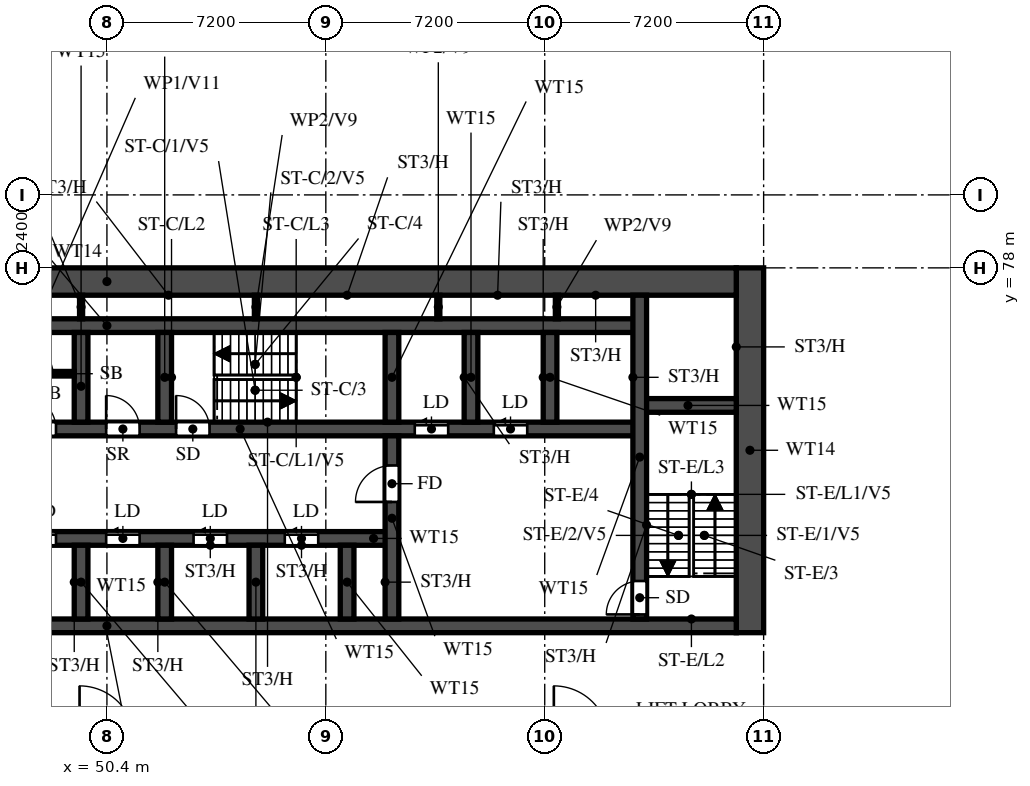
"""IFC4 building model, lengths in metres.
Left out: names, types, materials, properties, quantities, classifications, styles, units other than length and angle.
Written with IfcOpenShell. Run it as: python <this file> out.ifc"""

import sys

from ifc_helpers import new_model, si_unit, direction, frame, frame_2d, origin, place, context, subcontext, project, spatial, rectangle, extrude, element, fill, save


model = new_model("IFC4")
c1 = context("Model", 3, precision=1e-05, world=origin(), true_north=direction((0.0, 1.0)))
c2 = subcontext(c1, "Body", "Model", "MODEL_VIEW")
j1 = project(units=[si_unit("LENGTHUNIT", "METRE"), si_unit("PLANEANGLEUNIT", "RADIAN")], contexts=[c1])
p1 = place(None, origin())
s1 = spatial("IfcSite", under=j1, at=p1, CompositionType="ELEMENT")
p2 = place(p1, origin())
s2 = spatial("IfcBuilding", under=s1, at=p2, CompositionType="ELEMENT")
p3 = place(p2, origin())
s3 = spatial("IfcBuildingStorey", under=s2, at=p3, CompositionType="ELEMENT", Elevation=0.0)
p4 = place(p3, frame((71.55, 66.0, 0.0), z_axis=(0.0, 0.0, 1.0), x_axis=(0.0, 1.0, 0.0)))
e1 = element("IfcWall", 1, at=p4, inside=s3, PredefinedType="SHEAR", context=c2, shape_type="SweptSolid", body=[
    extrude(rectangle(XDim=12.0, YDim=0.9, at=frame_2d((6.0, 0.0))), origin(), (0.0, 0.0, 1.0), 7.4),
])
p5 = place(p3, frame((29.7, 77.55, 0.0), z_axis=(0.0, 0.0, 1.0), x_axis=(1.0, 0.0, 0.0)))
e2 = element("IfcWall", 2, at=p5, inside=s3, PredefinedType="SHEAR", context=c2, shape_type="SweptSolid", body=[
    extrude(rectangle(XDim=41.4, YDim=0.9, at=frame_2d((20.7, 0.0))), origin(), (0.0, 0.0, 1.0), 7.4),
])
p6 = place(p3, frame((29.7, 66.225, 0.0), z_axis=(0.0, 0.0, 1.0), x_axis=(1.0, 0.0, 0.0)))
e3 = element("IfcWall", 3, at=p6, inside=s3, PredefinedType="SHEAR", context=c2, shape_type="SweptSolid", body=[
    extrude(rectangle(XDim=41.4, YDim=0.45, at=frame_2d((20.7, 0.0))), origin(), (0.0, 0.0, 1.0), 7.4),
])
p7 = place(p6, frame((0.925, 0.0, 0.0)))
e4 = element("IfcOpeningElement", 4, at=p7, cuts=e3, PredefinedType="OPENING", context=c2, shape_type="SweptSolid", body=[
    extrude(rectangle(XDim=1.1, YDim=2.1, at=frame_2d((0.55, 1.05))), frame((0.0, 0.235, 0.0), z_axis=(0.0, -1.0, 0.0), x_axis=(1.0, 0.0, 0.0)), (0.0, 0.0, 1.0), 0.47),
])
p8 = place(p6, frame((3.738, 0.0, 0.0)))
e5 = element("IfcOpeningElement", 5, at=p8, cuts=e3, PredefinedType="OPENING", context=c2, shape_type="SweptSolid", body=[
    extrude(rectangle(XDim=1.8, YDim=2.1, at=frame_2d((0.9, 1.05))), frame((0.0, 0.235, 0.0), z_axis=(0.0, -1.0, 0.0), x_axis=(1.0, 0.0, 0.0)), (0.0, 0.0, 1.0), 0.47),
])
p9 = place(p3, frame((35.575, 69.1, 0.0), z_axis=(0.0, 0.0, 1.0), x_axis=(1.0, 0.0, 0.0)))
e6 = element("IfcWall", 6, at=p9, inside=s3, PredefinedType="SHEAR", context=c2, shape_type="SweptSolid", body=[
    extrude(rectangle(XDim=24.2, YDim=0.45, at=frame_2d((12.1, 0.0))), origin(), (0.0, 0.0, 1.0), 7.4),
])
p10 = place(p9, frame((1.05, 0.0, 0.0)))
e7 = element("IfcOpeningElement", 7, at=p10, cuts=e6, PredefinedType="OPENING", context=c2, shape_type="SweptSolid", body=[
    extrude(rectangle(XDim=1.1, YDim=2.1, at=frame_2d((0.55, 1.05))), frame((0.0, 0.235, 0.0), z_axis=(0.0, -1.0, 0.0), x_axis=(1.0, 0.0, 0.0)), (0.0, 0.0, 1.0), 0.47),
])
p11 = place(p9, frame((3.8, 0.0, 0.0)))
e8 = element("IfcOpeningElement", 8, at=p11, cuts=e6, PredefinedType="OPENING", context=c2, shape_type="SweptSolid", body=[
    extrude(rectangle(XDim=1.1, YDim=2.1, at=frame_2d((0.55, 1.05))), frame((0.0, 0.235, 0.0), z_axis=(0.0, -1.0, 0.0), x_axis=(1.0, 0.0, 0.0)), (0.0, 0.0, 1.0), 0.47),
])
p12 = place(p9, frame((6.55, 0.0, 0.0)))
e9 = element("IfcOpeningElement", 9, at=p12, cuts=e6, PredefinedType="OPENING", context=c2, shape_type="SweptSolid", body=[
    extrude(rectangle(XDim=1.1, YDim=2.1, at=frame_2d((0.55, 1.05))), frame((0.0, 0.235, 0.0), z_axis=(0.0, -1.0, 0.0), x_axis=(1.0, 0.0, 0.0)), (0.0, 0.0, 1.0), 0.47),
])
p13 = place(p9, frame((9.3, 0.0, 0.0)))
e10 = element("IfcOpeningElement", 10, at=p13, cuts=e6, PredefinedType="OPENING", context=c2, shape_type="SweptSolid", body=[
    extrude(rectangle(XDim=1.1, YDim=2.1, at=frame_2d((0.55, 1.05))), frame((0.0, 0.235, 0.0), z_axis=(0.0, -1.0, 0.0), x_axis=(1.0, 0.0, 0.0)), (0.0, 0.0, 1.0), 0.47),
])
p14 = place(p9, frame((12.05, 0.0, 0.0)))
e11 = element("IfcOpeningElement", 11, at=p14, cuts=e6, PredefinedType="OPENING", context=c2, shape_type="SweptSolid", body=[
    extrude(rectangle(XDim=1.1, YDim=2.1, at=frame_2d((0.55, 1.05))), frame((0.0, 0.235, 0.0), z_axis=(0.0, -1.0, 0.0), x_axis=(1.0, 0.0, 0.0)), (0.0, 0.0, 1.0), 0.47),
])
p15 = place(p9, frame((14.8, 0.0, 0.0)))
e12 = element("IfcOpeningElement", 12, at=p15, cuts=e6, PredefinedType="OPENING", context=c2, shape_type="SweptSolid", body=[
    extrude(rectangle(XDim=1.1, YDim=2.1, at=frame_2d((0.55, 1.05))), frame((0.0, 0.235, 0.0), z_axis=(0.0, -1.0, 0.0), x_axis=(1.0, 0.0, 0.0)), (0.0, 0.0, 1.0), 0.47),
])
p16 = place(p9, frame((17.675, 0.0, 0.0)))
e13 = element("IfcOpeningElement", 13, at=p16, cuts=e6, PredefinedType="OPENING", context=c2, shape_type="SweptSolid", body=[
    extrude(rectangle(XDim=1.1, YDim=2.1, at=frame_2d((0.55, 1.05))), frame((0.0, 0.235, 0.0), z_axis=(0.0, -1.0, 0.0), x_axis=(1.0, 0.0, 0.0)), (0.0, 0.0, 1.0), 0.47),
])
p17 = place(p9, frame((20.675, 0.0, 0.0)))
e14 = element("IfcOpeningElement", 14, at=p17, cuts=e6, PredefinedType="OPENING", context=c2, shape_type="SweptSolid", body=[
    extrude(rectangle(XDim=1.1, YDim=2.1, at=frame_2d((0.55, 1.05))), frame((0.0, 0.235, 0.0), z_axis=(0.0, -1.0, 0.0), x_axis=(1.0, 0.0, 0.0)), (0.0, 0.0, 1.0), 0.47),
])
p18 = place(p3, frame((32.875, 72.7, 0.0), z_axis=(0.0, 0.0, 1.0), x_axis=(1.0, 0.0, 0.0)))
e15 = element("IfcWall", 15, at=p18, inside=s3, PredefinedType="SHEAR", context=c2, shape_type="SweptSolid", body=[
    extrude(rectangle(XDim=35.05, YDim=0.45, at=frame_2d((17.525, 0.0))), origin(), (0.0, 0.0, 1.0), 7.4),
])
p19 = place(p18, frame((19.8, 0.0, 0.0)))
e16 = element("IfcOpeningElement", 16, at=p19, cuts=e15, PredefinedType="OPENING", context=c2, shape_type="SweptSolid", body=[
    extrude(rectangle(XDim=1.1, YDim=2.1, at=frame_2d((0.55, 1.05))), frame((0.0, 0.235, 0.0), z_axis=(0.0, -1.0, 0.0), x_axis=(1.0, 0.0, 0.0)), (0.0, 0.0, 1.0), 0.47),
])
p20 = place(p18, frame((27.65, 0.0, 0.0)))
e17 = element("IfcOpeningElement", 17, at=p20, cuts=e15, PredefinedType="OPENING", context=c2, shape_type="SweptSolid", body=[
    extrude(rectangle(XDim=1.1, YDim=2.1, at=frame_2d((0.55, 1.05))), frame((0.0, 0.235, 0.0), z_axis=(0.0, -1.0, 0.0), x_axis=(1.0, 0.0, 0.0)), (0.0, 0.0, 1.0), 0.47),
])
p21 = place(p18, frame((30.25, 0.0, 0.0)))
e18 = element("IfcOpeningElement", 18, at=p21, cuts=e15, PredefinedType="OPENING", context=c2, shape_type="SweptSolid", body=[
    extrude(rectangle(XDim=1.1, YDim=2.1, at=frame_2d((0.55, 1.05))), frame((0.0, 0.235, 0.0), z_axis=(0.0, -1.0, 0.0), x_axis=(1.0, 0.0, 0.0)), (0.0, 0.0, 1.0), 0.47),
])
p22 = place(p18, frame((3.75, 0.0, 0.0)))
e19 = element("IfcOpeningElement", 19, at=p22, cuts=e15, PredefinedType="OPENING", context=c2, shape_type="SweptSolid", body=[
    extrude(rectangle(XDim=1.1, YDim=2.1, at=frame_2d((0.55, 1.05))), frame((0.0, 0.235, 0.0), z_axis=(0.0, -1.0, 0.0), x_axis=(1.0, 0.0, 0.0)), (0.0, 0.0, 1.0), 0.47),
])
p23 = place(p18, frame((6.5, 0.0, 0.0)))
e20 = element("IfcOpeningElement", 20, at=p23, cuts=e15, PredefinedType="OPENING", context=c2, shape_type="SweptSolid", body=[
    extrude(rectangle(XDim=1.1, YDim=2.1, at=frame_2d((0.55, 1.05))), frame((0.0, 0.235, 0.0), z_axis=(0.0, -1.0, 0.0), x_axis=(1.0, 0.0, 0.0)), (0.0, 0.0, 1.0), 0.47),
])
p24 = place(p18, frame((9.25, 0.0, 0.0)))
e21 = element("IfcOpeningElement", 21, at=p24, cuts=e15, PredefinedType="OPENING", context=c2, shape_type="SweptSolid", body=[
    extrude(rectangle(XDim=1.1, YDim=2.1, at=frame_2d((0.55, 1.05))), frame((0.0, 0.235, 0.0), z_axis=(0.0, -1.0, 0.0), x_axis=(1.0, 0.0, 0.0)), (0.0, 0.0, 1.0), 0.47),
])
p25 = place(p18, frame((12.0, 0.0, 0.0)))
e22 = element("IfcOpeningElement", 22, at=p25, cuts=e15, PredefinedType="OPENING", context=c2, shape_type="SweptSolid", body=[
    extrude(rectangle(XDim=1.1, YDim=2.1, at=frame_2d((0.55, 1.05))), frame((0.0, 0.235, 0.0), z_axis=(0.0, -1.0, 0.0), x_axis=(1.0, 0.0, 0.0)), (0.0, 0.0, 1.0), 0.47),
])
p26 = place(p18, frame((14.75, 0.0, 0.0)))
e23 = element("IfcOpeningElement", 23, at=p26, cuts=e15, PredefinedType="OPENING", context=c2, shape_type="SweptSolid", body=[
    extrude(rectangle(XDim=1.1, YDim=2.1, at=frame_2d((0.55, 1.05))), frame((0.0, 0.235, 0.0), z_axis=(0.0, -1.0, 0.0), x_axis=(1.0, 0.0, 0.0)), (0.0, 0.0, 1.0), 0.47),
])
p27 = place(p18, frame((17.5, 0.0, 0.0)))
e24 = element("IfcOpeningElement", 24, at=p27, cuts=e15, PredefinedType="OPENING", context=c2, shape_type="SweptSolid", body=[
    extrude(rectangle(XDim=1.1, YDim=2.1, at=frame_2d((0.55, 1.05))), frame((0.0, 0.235, 0.0), z_axis=(0.0, -1.0, 0.0), x_axis=(1.0, 0.0, 0.0)), (0.0, 0.0, 1.0), 0.47),
])
p28 = place(p18, frame((0.913, 0.0, 0.0)))
e25 = element("IfcOpeningElement", 25, at=p28, cuts=e15, PredefinedType="OPENING", context=c2, shape_type="SweptSolid", body=[
    extrude(rectangle(XDim=1.1, YDim=2.1, at=frame_2d((0.55, 1.05))), frame((0.0, 0.235, 0.0), z_axis=(0.0, -1.0, 0.0), x_axis=(1.0, 0.0, 0.0)), (0.0, 0.0, 1.0), 0.47),
])
p29 = place(p3, frame((32.875, 76.1, 0.0), z_axis=(0.0, 0.0, 1.0), x_axis=(1.0, 0.0, 0.0)))
e26 = element("IfcWall", 26, at=p29, inside=s3, PredefinedType="SHEAR", context=c2, shape_type="SweptSolid", body=[
    extrude(rectangle(XDim=35.05, YDim=0.45, at=frame_2d((17.525, 0.0))), origin(), (0.0, 0.0, 1.0), 7.4),
])
p30 = place(p3, frame((67.925, 73.475, 0.0), z_axis=(0.0, 0.0, 1.0), x_axis=(1.0, 0.0, 0.0)))
e27 = element("IfcWall", 27, at=p30, inside=s3, PredefinedType="SHEAR", context=c2, shape_type="SweptSolid", body=[
    extrude(rectangle(XDim=3.175, YDim=0.45, at=frame_2d((1.587, 0.0))), origin(), (0.0, 0.0, 1.0), 7.4),
])
p31 = place(p3, frame((67.925, 66.45, 0.0), z_axis=(0.0, 0.0, 1.0), x_axis=(0.0, 1.0, 0.0)))
e28 = element("IfcWall", 28, at=p31, inside=s3, PredefinedType="SHEAR", context=c2, shape_type="SweptSolid", body=[
    extrude(rectangle(XDim=10.65, YDim=0.45, at=frame_2d((5.325, 0.0))), origin(), (0.0, 0.0, 1.0), 7.4),
])
p32 = place(p31, frame((0.15, 0.0, 0.0)))
e29 = element("IfcOpeningElement", 29, at=p32, cuts=e28, PredefinedType="OPENING", context=c2, shape_type="SweptSolid", body=[
    extrude(rectangle(XDim=1.1, YDim=2.1, at=frame_2d((0.55, 1.05))), frame((0.0, 0.235, 0.0), z_axis=(0.0, -1.0, 0.0), x_axis=(1.0, 0.0, 0.0)), (0.0, 0.0, 1.0), 0.47),
])
p33 = place(p3, frame((59.775, 66.45, 0.0), z_axis=(0.0, 0.0, 1.0), x_axis=(0.0, 1.0, 0.0)))
e30 = element("IfcWall", 30, at=p33, inside=s3, PredefinedType="SHEAR", context=c2, shape_type="SweptSolid", body=[
    extrude(rectangle(XDim=6.025, YDim=0.45, at=frame_2d((3.013, 0.0))), origin(), (0.0, 0.0, 1.0), 7.4),
])
p34 = place(p33, frame((3.85, 0.0, 0.0)))
e31 = element("IfcOpeningElement", 31, at=p34, cuts=e30, PredefinedType="OPENING", context=c2, shape_type="SweptSolid", body=[
    extrude(rectangle(XDim=1.2, YDim=2.1, at=frame_2d((0.6, 1.05))), frame((0.0, 0.235, 0.0), z_axis=(0.0, -1.0, 0.0), x_axis=(1.0, 0.0, 0.0)), (0.0, 0.0, 1.0), 0.47),
])
p35 = place(p3, frame((59.775, 72.925, 0.0), z_axis=(0.0, 0.0, 1.0), x_axis=(0.0, 1.0, 0.0)))
e32 = element("IfcWall", 32, at=p35, inside=s3, PredefinedType="SHEAR", context=c2, shape_type="SweptSolid", body=[
    extrude(rectangle(XDim=2.95, YDim=0.45, at=frame_2d((1.475, 0.0))), origin(), (0.0, 0.0, 1.0), 7.4),
])
for number, where, z_axis, x_axis in (
    (33, (49.55, 66.45, 0.0), (0.0, 0.0, 1.0), (0.0, 1.0, 0.0)),
    (34, (52.3, 66.45, 0.0), (0.0, 0.0, 1.0), (0.0, 1.0, 0.0)),
    (35, (55.3, 66.45, 0.0), (0.0, 0.0, 1.0), (0.0, 1.0, 0.0)),
    (36, (58.3, 66.45, 0.0), (0.0, 0.0, 1.0), (0.0, 1.0, 0.0)),
):
    element("IfcWall", number, at=place(p3, frame(where, z_axis=z_axis, x_axis=x_axis)), inside=s3, PredefinedType="SHEAR", context=c2, shape_type="SweptSolid", body=[
        extrude(rectangle(XDim=2.425, YDim=0.45, at=frame_2d((1.212, 0.0))), origin(), (0.0, 0.0, 1.0), 7.4),
    ])
for number, where, z_axis, x_axis in (
    (37, (49.55, 72.925, 0.0), (0.0, 0.0, 1.0), (0.0, 1.0, 0.0)),
    (38, (52.3, 72.925, 0.0), (0.0, 0.0, 1.0), (0.0, 1.0, 0.0)),
    (39, (62.375, 72.925, 0.0), (0.0, 0.0, 1.0), (0.0, 1.0, 0.0)),
    (40, (64.975, 72.925, 0.0), (0.0, 0.0, 1.0), (0.0, 1.0, 0.0)),
):
    element("IfcWall", number, at=place(p3, frame(where, z_axis=z_axis, x_axis=x_axis)), inside=s3, PredefinedType="SHEAR", context=c2, shape_type="SweptSolid", body=[
        extrude(rectangle(XDim=2.95, YDim=0.45, at=frame_2d((1.475, 0.0))), origin(), (0.0, 0.0, 1.0), 7.4),
    ])
p36 = place(p3, frame((47.025, 74.518, 0.0), z_axis=(0.0, 0.0, 1.0), x_axis=(1.0, 0.0, 0.0)))
e41 = element("IfcWall", 41, at=p36, inside=s3, PredefinedType="PARTITIONING", context=c2, shape_type="SweptSolid", body=[
    extrude(rectangle(XDim=2.3, YDim=0.15, at=frame_2d((1.15, 0.0))), origin(), (0.0, 0.0, 1.0), 7.4),
])
p37 = place(p36, frame((0.7, 0.0, 0.0)))
e42 = element("IfcOpeningElement", 42, at=p37, cuts=e41, PredefinedType="OPENING", context=c2, shape_type="SweptSolid", body=[
    extrude(rectangle(XDim=0.9, YDim=2.1, at=frame_2d((0.45, 1.05))), frame((0.0, 0.085, 0.0), z_axis=(0.0, -1.0, 0.0), x_axis=(1.0, 0.0, 0.0)), (0.0, 0.0, 1.0), 0.17),
])
for number, where, z_axis, x_axis in (
    (43, (49.55, 76.325, 0.0), (0.0, 0.0, 1.0), (0.0, 1.0, 0.0)),
    (44, (55.3, 76.325, 0.0), (0.0, 0.0, 1.0), (0.0, 1.0, 0.0)),
    (45, (61.3, 76.325, 0.0), (0.0, 0.0, 1.0), (0.0, 1.0, 0.0)),
    (46, (65.2, 76.325, 0.0), (0.0, 0.0, 1.0), (0.0, 1.0, 0.0)),
):
    element("IfcWall", number, at=place(p3, frame(where, z_axis=z_axis, x_axis=x_axis)), inside=s3, PredefinedType="PARTITIONING", context=c2, shape_type="SweptSolid", body=[
        extrude(rectangle(XDim=0.775, YDim=0.1, at=frame_2d((0.388, 0.0))), origin(), (0.0, 0.0, 1.0), 7.4),
    ])
p38 = place(p19, origin())
e47 = element("IfcDoor", 47, at=p38, inside=s3, OperationType="SINGLE_SWING_LEFT", PredefinedType="DOOR", context=c2, shape_type="SweptSolid", body=[
    extrude(rectangle(XDim=1.1, YDim=2.1, at=frame_2d((0.55, 1.05))), frame((0.0, 0.025, 0.0), z_axis=(0.0, -1.0, 0.0), x_axis=(1.0, 0.0, 0.0)), (0.0, 0.0, 1.0), 0.05),
])
fill(e16, e47)
p39 = place(p32, origin())
e48 = element("IfcDoor", 48, at=p39, inside=s3, OperationType="SINGLE_SWING_LEFT", PredefinedType="DOOR", context=c2, shape_type="SweptSolid", body=[
    extrude(rectangle(XDim=1.1, YDim=2.1, at=frame_2d((0.55, 1.05))), frame((0.0, 0.025, 0.0), z_axis=(0.0, -1.0, 0.0), x_axis=(1.0, 0.0, 0.0)), (0.0, 0.0, 1.0), 0.05),
])
fill(e29, e48)
p40 = place(p34, origin())
e49 = element("IfcDoor", 49, at=p40, inside=s3, OperationType="SINGLE_SWING_RIGHT", PredefinedType="DOOR", context=c2, shape_type="SweptSolid", body=[
    extrude(rectangle(XDim=1.2, YDim=2.1, at=frame_2d((0.6, 1.05))), frame((0.0, 0.025, 0.0), z_axis=(0.0, -1.0, 0.0), x_axis=(1.0, 0.0, 0.0)), (0.0, 0.0, 1.0), 0.05),
])
fill(e31, e49)
p41 = place(p20, origin())
e50 = element("IfcDoor", 50, at=p41, inside=s3, OperationType="SLIDING_TO_LEFT", PredefinedType="DOOR", context=c2, shape_type="SweptSolid", body=[
    extrude(rectangle(XDim=1.1, YDim=2.1, at=frame_2d((0.55, 1.05))), frame((0.0, 0.025, 0.0), z_axis=(0.0, -1.0, 0.0), x_axis=(1.0, 0.0, 0.0)), (0.0, 0.0, 1.0), 0.05),
])
fill(e17, e50)
p42 = place(p21, origin())
e51 = element("IfcDoor", 51, at=p42, inside=s3, OperationType="SLIDING_TO_LEFT", PredefinedType="DOOR", context=c2, shape_type="SweptSolid", body=[
    extrude(rectangle(XDim=1.1, YDim=2.1, at=frame_2d((0.55, 1.05))), frame((0.0, 0.025, 0.0), z_axis=(0.0, -1.0, 0.0), x_axis=(1.0, 0.0, 0.0)), (0.0, 0.0, 1.0), 0.05),
])
fill(e18, e51)
p43 = place(p14, origin())
e52 = element("IfcDoor", 52, at=p43, inside=s3, OperationType="SLIDING_TO_LEFT", PredefinedType="DOOR", context=c2, shape_type="SweptSolid", body=[
    extrude(rectangle(XDim=1.1, YDim=2.1, at=frame_2d((0.55, 1.05))), frame((0.0, 0.025, 0.0), z_axis=(0.0, -1.0, 0.0), x_axis=(1.0, 0.0, 0.0)), (0.0, 0.0, 1.0), 0.05),
])
fill(e11, e52)
p44 = place(p15, origin())
e53 = element("IfcDoor", 53, at=p44, inside=s3, OperationType="SLIDING_TO_LEFT", PredefinedType="DOOR", context=c2, shape_type="SweptSolid", body=[
    extrude(rectangle(XDim=1.1, YDim=2.1, at=frame_2d((0.55, 1.05))), frame((0.0, 0.025, 0.0), z_axis=(0.0, -1.0, 0.0), x_axis=(1.0, 0.0, 0.0)), (0.0, 0.0, 1.0), 0.05),
])
fill(e12, e53)
p45 = place(p16, origin())
e54 = element("IfcDoor", 54, at=p45, inside=s3, OperationType="SLIDING_TO_LEFT", PredefinedType="DOOR", context=c2, shape_type="SweptSolid", body=[
    extrude(rectangle(XDim=1.1, YDim=2.1, at=frame_2d((0.55, 1.05))), frame((0.0, 0.025, 0.0), z_axis=(0.0, -1.0, 0.0), x_axis=(1.0, 0.0, 0.0)), (0.0, 0.0, 1.0), 0.05),
])
fill(e13, e54)
p46 = place(p17, origin())
e55 = element("IfcDoor", 55, at=p46, inside=s3, OperationType="SLIDING_TO_LEFT", PredefinedType="DOOR", context=c2, shape_type="SweptSolid", body=[
    extrude(rectangle(XDim=1.1, YDim=2.1, at=frame_2d((0.55, 1.05))), frame((0.0, 0.025, 0.0), z_axis=(0.0, -1.0, 0.0), x_axis=(1.0, 0.0, 0.0)), (0.0, 0.0, 1.0), 0.05),
])
fill(e14, e55)
p47 = place(p26, origin())
e56 = element("IfcDoor", 56, at=p47, inside=s3, OperationType="SINGLE_SWING_LEFT", PredefinedType="DOOR", context=c2, shape_type="SweptSolid", body=[
    extrude(rectangle(XDim=1.1, YDim=2.1, at=frame_2d((0.55, 1.05))), frame((0.0, 0.025, 0.0), z_axis=(0.0, -1.0, 0.0), x_axis=(1.0, 0.0, 0.0)), (0.0, 0.0, 1.0), 0.05),
])
fill(e23, e56)
p48 = place(p37, origin())
e57 = element("IfcDoor", 57, at=p48, inside=s3, OperationType="SINGLE_SWING_RIGHT", PredefinedType="DOOR", context=c2, shape_type="SweptSolid", body=[
    extrude(rectangle(XDim=0.9, YDim=2.1, at=frame_2d((0.45, 1.05))), frame((0.0, 0.025, 0.0), z_axis=(0.0, -1.0, 0.0), x_axis=(1.0, 0.0, 0.0)), (0.0, 0.0, 1.0), 0.05),
])
fill(e42, e57)
p49 = place(p27, origin())
e58 = element("IfcDoor", 58, at=p49, inside=s3, OperationType="SINGLE_SWING_LEFT", PredefinedType="DOOR", context=c2, shape_type="SweptSolid", body=[
    extrude(rectangle(XDim=1.1, YDim=2.1, at=frame_2d((0.55, 1.05))), frame((0.0, 0.025, 0.0), z_axis=(0.0, -1.0, 0.0), x_axis=(1.0, 0.0, 0.0)), (0.0, 0.0, 1.0), 0.05),
])
fill(e24, e58)
save(model, sys.argv[1])
